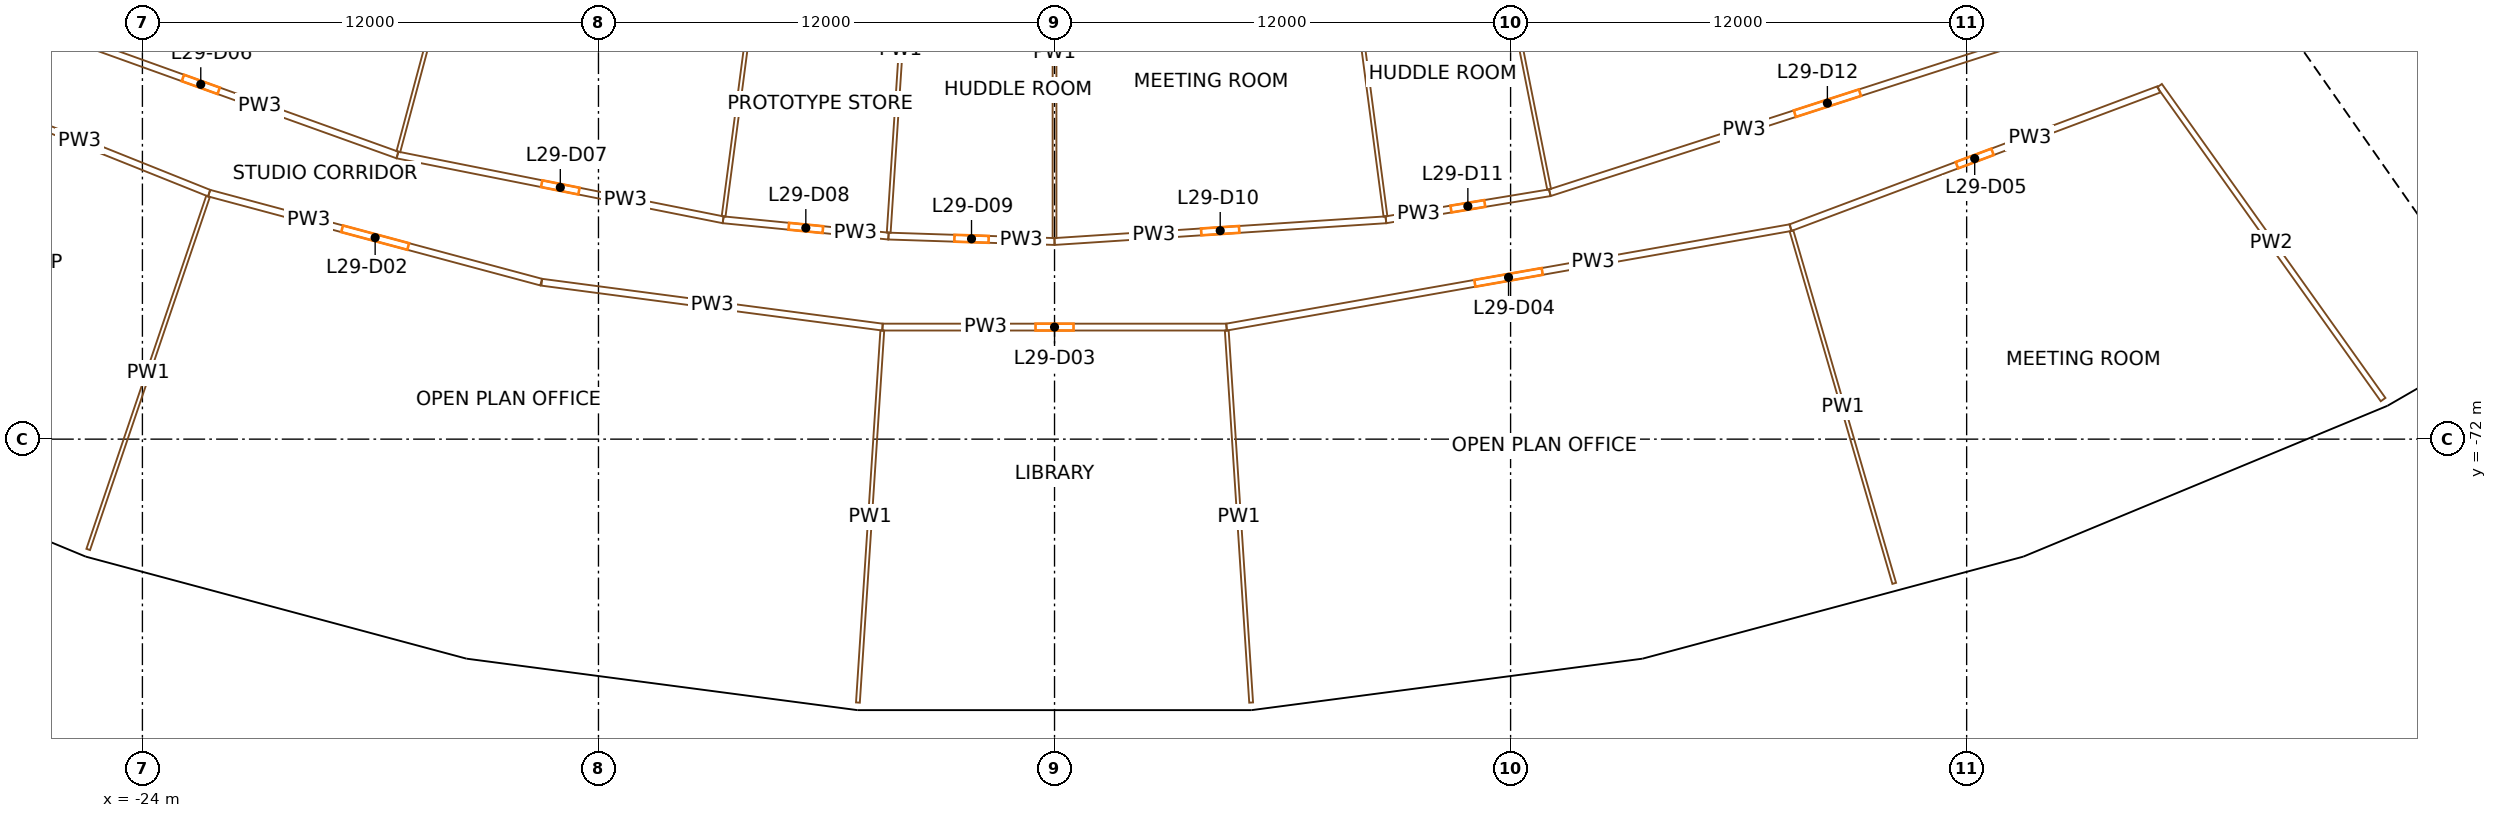
"""IFC4 building model, lengths in metres.
Left out: names, types, materials, properties, quantities, classifications, styles, units other than length and angle.
Written with IfcOpenShell. Run it as: python <this file> out.ifc"""

import sys

from ifc_helpers import new_model, si_unit, direction, frame, frame_2d, origin, origin_2d, place, context, subcontext, project, spatial, rectangle, extrude, element, fill, save


model = new_model("IFC4")
c1 = context("Model", 3, precision=1e-05, world=origin(), true_north=direction((0.0, 1.0)))
c2 = subcontext(c1, "Body", "Model", "MODEL_VIEW")
j1 = project(units=[si_unit("LENGTHUNIT", "METRE"), si_unit("PLANEANGLEUNIT", "RADIAN")], contexts=[c1])
p1 = place(None, origin())
s1 = spatial("IfcSite", under=j1, at=p1, CompositionType="ELEMENT")
p2 = place(p1, origin())
s2 = spatial("IfcBuilding", under=s1, at=p2, CompositionType="ELEMENT")
p3 = place(p2, frame((0.0, 0.0, 129.1)))
s3 = spatial("IfcBuildingStorey", under=s2, at=p3, CompositionType="ELEMENT", Elevation=129.1)
for number, where, z_axis, x_axis in (
    (1, (-24.992, -73.624, 0.0), (0.0, 0.0, 1.0), (0.947, -0.321, 0.0)),
    (2, (-15.168, -76.256, 0.0), (0.0, 0.0, 1.0), (0.981, -0.195, 0.0)),
    (3, (-5.085, -77.583, 0.0), (0.0, 0.0, 1.0), (0.998, -0.065, 0.0)),
    (4, (5.085, -77.583, 0.0), (0.0, 0.0, 1.0), (0.998, 0.065, 0.0)),
    (5, (15.168, -76.256, 0.0), (0.0, 0.0, 1.0), (0.981, 0.195, 0.0)),
    (6, (24.992, -73.624, 0.0), (0.0, 0.0, 1.0), (0.947, 0.321, 0.0)),
    (7, (34.388, -69.732, 0.0), (0.0, 0.0, 1.0), (0.897, 0.442, 0.0)),
):
    element("IfcColumn", number, at=place(p3, frame(where, z_axis=z_axis, x_axis=x_axis)), inside=s3, PredefinedType="COLUMN", context=c2, shape_type="SweptSolid", body=[
        extrude(rectangle(XDim=1.2, YDim=1.5, at=origin_2d()), origin(), (0.0, 0.0, 1.0), 3.8),
    ])
p4 = place(p3, frame((36.717, -66.337, 0.0), z_axis=(0.0, 0.0, 1.0), x_axis=(-0.573577477574, 0.819151315216, 0.0)))
e8 = element("IfcWall", 8, at=p4, inside=s3, PredefinedType="SHEAR", context=c2, shape_type="SweptSolid", body=[
    extrude(rectangle(XDim=14.8, YDim=0.9, at=frame_2d((7.4, 0.0))), origin(), (0.0, 0.0, 1.0), 3.5),
])
p5 = place(p4, frame((6.2, 0.0, 0.0)))
e9 = element("IfcOpeningElement", 9, at=p5, cuts=e8, PredefinedType="OPENING", context=c2, shape_type="SweptSolid", body=[
    extrude(rectangle(XDim=2.4, YDim=2.1, at=frame_2d((1.2, 1.05))), frame((0.0, 0.46, 0.0), z_axis=(0.0, -1.0, 0.0), x_axis=(1.0, 0.0, 0.0)), (0.0, 0.0, 1.0), 0.92),
])
p6 = place(p3, frame((35.221, -63.417, 0.0), z_axis=(0.0, 0.0, 1.0), x_axis=(0.819166993208, 0.573555086491, 0.0)))
e10 = element("IfcWall", 10, at=p6, inside=s3, PredefinedType="SOLIDWALL", context=c2, shape_type="SweptSolid", body=[
    extrude(rectangle(XDim=7.95, YDim=0.3, at=frame_2d((3.975, 0.0))), origin(), (0.0, 0.0, 1.0), 3.5),
])
p7 = place(p3, frame((-29.058, -62.799, 0.0), z_axis=(0.0, 0.0, 1.0), x_axis=(0.92834358791, -0.371723261025, 0.0)))
e11 = element("IfcWall", 11, at=p7, inside=s3, PredefinedType="PARTITIONING", context=c2, shape_type="SweptSolid", body=[
    extrude(rectangle(XDim=7.34, YDim=0.18, at=frame_2d((3.67, 0.0))), origin(), (0.0, 0.0, 1.0), 2.4),
])
p8 = place(p3, frame((-27.64, -60.807, 0.0), z_axis=(0.0, 0.0, 1.0), x_axis=(0.941150861554, -0.337986768669, 0.0)))
e12 = element("IfcWall", 12, at=p8, inside=s3, PredefinedType="PARTITIONING", context=c2, shape_type="SweptSolid", body=[
    extrude(rectangle(XDim=10.998, YDim=0.18, at=frame_2d((5.499, 0.0))), origin(), (0.0, 0.0, 1.0), 2.4),
])
p9 = place(p8, frame((4.999, 0.0, 0.0)))
e13 = element("IfcOpeningElement", 13, at=p9, cuts=e12, PredefinedType="OPENING", context=c2, shape_type="SweptSolid", body=[
    extrude(rectangle(XDim=1.0, YDim=2.1, at=frame_2d((0.5, 1.05))), frame((0.0, 0.1, 0.0), z_axis=(0.0, -1.0, 0.0), x_axis=(1.0, 0.0, 0.0)), (0.0, 0.0, 1.0), 0.2),
])
p10 = place(p3, frame((-25.426, -74.902, 0.0), z_axis=(0.0, 0.0, 1.0), x_axis=(0.321441806318, 0.946929334824, 0.0)))
e14 = element("IfcWall", 14, at=p10, inside=s3, PredefinedType="PARTITIONING", context=c2, shape_type="SweptSolid", body=[
    extrude(rectangle(XDim=9.81, YDim=0.1, at=frame_2d((4.905, 0.0))), origin(), (0.0, 0.0, 1.0), 2.4),
])
p11 = place(p3, frame((-13.509, -67.868, 0.0), z_axis=(0.0, 0.0, 1.0), x_axis=(-0.965930457668, 0.258801759942, 0.0)))
e15 = element("IfcWall", 15, at=p11, inside=s3, PredefinedType="PARTITIONING", context=c2, shape_type="SweptSolid", body=[
    extrude(rectangle(XDim=9.043, YDim=0.18, at=frame_2d((4.521, 0.0))), origin(), (0.0, 0.0, 1.0), 2.4),
])
p12 = place(p11, frame((3.621, 0.0, 0.0)))
e16 = element("IfcOpeningElement", 16, at=p12, cuts=e15, PredefinedType="OPENING", context=c2, shape_type="SweptSolid", body=[
    extrude(rectangle(XDim=1.8, YDim=2.1, at=frame_2d((0.9, 1.05))), frame((0.0, 0.1, 0.0), z_axis=(0.0, -1.0, 0.0), x_axis=(1.0, 0.0, 0.0)), (0.0, 0.0, 1.0), 0.2),
])
p13 = place(p3, frame((-17.289, -64.524, 0.0), z_axis=(0.0, 0.0, 1.0), x_axis=(0.980786466832, -0.195084357342, 0.0)))
e17 = element("IfcWall", 17, at=p13, inside=s3, PredefinedType="PARTITIONING", context=c2, shape_type="SweptSolid", body=[
    extrude(rectangle(XDim=8.738, YDim=0.18, at=frame_2d((4.369, 0.0))), origin(), (0.0, 0.0, 1.0), 2.4),
])
p14 = place(p13, frame((3.869, 0.0, 0.0)))
e18 = element("IfcOpeningElement", 18, at=p14, cuts=e17, PredefinedType="OPENING", context=c2, shape_type="SweptSolid", body=[
    extrude(rectangle(XDim=1.0, YDim=2.1, at=frame_2d((0.5, 1.05))), frame((0.0, 0.1, 0.0), z_axis=(0.0, -1.0, 0.0), x_axis=(1.0, 0.0, 0.0)), (0.0, 0.0, 1.0), 0.2),
])
p15 = place(p3, frame((-14.747, -55.037, 0.0), z_axis=(0.0, 0.0, 1.0), x_axis=(-0.258828880572, -0.965923190829, 0.0)))
e19 = element("IfcWall", 19, at=p15, inside=s3, PredefinedType="PARTITIONING", context=c2, shape_type="SweptSolid", body=[
    extrude(rectangle(XDim=9.731, YDim=0.1, at=frame_2d((4.866, 0.0))), origin(), (0.0, 0.0, 1.0), 2.4),
])
p16 = place(p3, frame((-13.491, -67.872, 0.0), z_axis=(0.0, 0.0, 1.0), x_axis=(0.991447218368, -0.130508287819, 0.0)))
e20 = element("IfcWall", 20, at=p16, inside=s3, PredefinedType="PARTITIONING", context=c2, shape_type="SweptSolid", body=[
    extrude(rectangle(XDim=9.043, YDim=0.18, at=frame_2d((4.521, 0.0))), origin(), (0.0, 0.0, 1.0), 2.4),
])
p17 = place(p3, frame((-8.719, -66.229, 0.0), z_axis=(0.0, 0.0, 1.0), x_axis=(0.995184826457, -0.098016127192, 0.0)))
e21 = element("IfcWall", 21, at=p17, inside=s3, PredefinedType="PARTITIONING", context=c2, shape_type="SweptSolid", body=[
    extrude(rectangle(XDim=4.371, YDim=0.18, at=frame_2d((2.186, 0.0))), origin(), (0.0, 0.0, 1.0), 2.4),
])
p18 = place(p17, frame((1.736, 0.0, 0.0)))
e22 = element("IfcOpeningElement", 22, at=p18, cuts=e21, PredefinedType="OPENING", context=c2, shape_type="SweptSolid", body=[
    extrude(rectangle(XDim=0.9, YDim=2.1, at=frame_2d((0.45, 1.05))), frame((0.0, 0.1, 0.0), z_axis=(0.0, -1.0, 0.0), x_axis=(1.0, 0.0, 0.0)), (0.0, 0.0, 1.0), 0.2),
])
p19 = place(p3, frame((-7.437, -56.491, 0.0), z_axis=(0.0, 0.0, 1.0), x_axis=(-0.130531739513, -0.991444131043, 0.0)))
e23 = element("IfcWall", 23, at=p19, inside=s3, PredefinedType="PARTITIONING", context=c2, shape_type="SweptSolid", body=[
    extrude(rectangle(XDim=9.731, YDim=0.1, at=frame_2d((4.866, 0.0))), origin(), (0.0, 0.0, 1.0), 2.4),
])
p20 = place(p3, frame((-5.173, -78.931, 0.0), z_axis=(0.0, 0.0, 1.0), x_axis=(0.065402368846, 0.997858973077, 0.0)))
e24 = element("IfcWall", 24, at=p20, inside=s3, PredefinedType="PARTITIONING", context=c2, shape_type="SweptSolid", body=[
    extrude(rectangle(XDim=9.81, YDim=0.1, at=frame_2d((4.905, 0.0))), origin(), (0.0, 0.0, 1.0), 2.4),
])
p21 = place(p3, frame((4.526, -69.052, 0.0), z_axis=(0.0, 0.0, 1.0), x_axis=(-1.0, 0.0, 0.0)))
e25 = element("IfcWall", 25, at=p21, inside=s3, PredefinedType="PARTITIONING", context=c2, shape_type="SweptSolid", body=[
    extrude(rectangle(XDim=9.052, YDim=0.18, at=frame_2d((4.526, 0.0))), origin(), (0.0, 0.0, 1.0), 2.4),
])
p22 = place(p21, frame((4.026, 0.0, 0.0)))
e26 = element("IfcOpeningElement", 26, at=p22, cuts=e25, PredefinedType="OPENING", context=c2, shape_type="SweptSolid", body=[
    extrude(rectangle(XDim=1.0, YDim=2.1, at=frame_2d((0.5, 1.05))), frame((0.0, 0.1, 0.0), z_axis=(0.0, -1.0, 0.0), x_axis=(1.0, 0.0, 0.0)), (0.0, 0.0, 1.0), 0.2),
])
p23 = place(p3, frame((-4.369, -66.657, 0.0), z_axis=(0.0, 0.0, 1.0), x_axis=(0.99946426167, -0.03272903366, 0.0)))
e27 = element("IfcWall", 27, at=p23, inside=s3, PredefinedType="PARTITIONING", context=c2, shape_type="SweptSolid", body=[
    extrude(rectangle(XDim=4.371, YDim=0.18, at=frame_2d((2.186, 0.0))), origin(), (0.0, 0.0, 1.0), 2.4),
])
p24 = place(p23, frame((1.736, 0.0, 0.0)))
e28 = element("IfcOpeningElement", 28, at=p24, cuts=e27, PredefinedType="OPENING", context=c2, shape_type="SweptSolid", body=[
    extrude(rectangle(XDim=0.9, YDim=2.1, at=frame_2d((0.45, 1.05))), frame((0.0, 0.1, 0.0), z_axis=(0.0, -1.0, 0.0), x_axis=(1.0, 0.0, 0.0)), (0.0, 0.0, 1.0), 0.2),
])
p25 = place(p3, frame((-3.735, -56.978, 0.0), z_axis=(0.0, 0.0, 1.0), x_axis=(-0.065392602582, -0.997859613136, 0.0)))
e29 = element("IfcWall", 29, at=p25, inside=s3, PredefinedType="PARTITIONING", context=c2, shape_type="SweptSolid", body=[
    extrude(rectangle(XDim=9.61, YDim=0.1, at=frame_2d((4.805, 0.0))), origin(), (0.0, 0.0, 1.0), 2.4),
])
p26 = place(p3, frame((0.0, -66.8, 0.0), z_axis=(0.0, 0.0, 1.0), x_axis=(0.997858593599, 0.065408158359, 0.0)))
e30 = element("IfcWall", 30, at=p26, inside=s3, PredefinedType="PARTITIONING", context=c2, shape_type="SweptSolid", body=[
    extrude(rectangle(XDim=8.738, YDim=0.18, at=frame_2d((4.369, 0.0))), origin(), (0.0, 0.0, 1.0), 2.4),
])
p27 = place(p26, frame((3.869, 0.0, 0.0)))
e31 = element("IfcOpeningElement", 31, at=p27, cuts=e30, PredefinedType="OPENING", context=c2, shape_type="SweptSolid", body=[
    extrude(rectangle(XDim=1.0, YDim=2.1, at=frame_2d((0.5, 1.05))), frame((0.0, 0.1, 0.0), z_axis=(0.0, -1.0, 0.0), x_axis=(1.0, 0.0, 0.0)), (0.0, 0.0, 1.0), 0.2),
])
p28 = place(p3, frame((0.0, -56.979, 0.0), z_axis=(0.0, 0.0, 1.0), x_axis=(0.0, -1.0, 0.0)))
e32 = element("IfcWall", 32, at=p28, inside=s3, PredefinedType="PARTITIONING", context=c2, shape_type="SweptSolid", body=[
    extrude(rectangle(XDim=9.731, YDim=0.1, at=frame_2d((4.866, 0.0))), origin(), (0.0, 0.0, 1.0), 2.4),
])
p29 = place(p3, frame((19.366, -66.435, 0.0), z_axis=(0.0, 0.0, 1.0), x_axis=(-0.984805080703, -0.173663332402, 0.0)))
e33 = element("IfcWall", 33, at=p29, inside=s3, PredefinedType="PARTITIONING", context=c2, shape_type="SweptSolid", body=[
    extrude(rectangle(XDim=15.069, YDim=0.18, at=frame_2d((7.535, 0.0))), origin(), (0.0, 0.0, 1.0), 2.4),
])
p30 = place(p29, frame((6.635, 0.0, 0.0)))
e34 = element("IfcOpeningElement", 34, at=p30, cuts=e33, PredefinedType="OPENING", context=c2, shape_type="SweptSolid", body=[
    extrude(rectangle(XDim=1.8, YDim=2.1, at=frame_2d((0.9, 1.05))), frame((0.0, 0.1, 0.0), z_axis=(0.0, -1.0, 0.0), x_axis=(1.0, 0.0, 0.0)), (0.0, 0.0, 1.0), 0.2),
])
p31 = place(p3, frame((5.173, -78.931, 0.0), z_axis=(0.0, 0.0, 1.0), x_axis=(-0.065402368846, 0.997858973077, 0.0)))
e35 = element("IfcWall", 35, at=p31, inside=s3, PredefinedType="PARTITIONING", context=c2, shape_type="SweptSolid", body=[
    extrude(rectangle(XDim=9.81, YDim=0.1, at=frame_2d((4.905, 0.0))), origin(), (0.0, 0.0, 1.0), 2.4),
])
p32 = place(p3, frame((7.437, -56.491, 0.0), z_axis=(0.0, 0.0, 1.0), x_axis=(0.130531739513, -0.991444131043, 0.0)))
e36 = element("IfcWall", 36, at=p32, inside=s3, PredefinedType="PARTITIONING", context=c2, shape_type="SweptSolid", body=[
    extrude(rectangle(XDim=9.731, YDim=0.1, at=frame_2d((4.866, 0.0))), origin(), (0.0, 0.0, 1.0), 2.4),
])
p33 = place(p3, frame((8.719, -66.229, 0.0), z_axis=(0.0, 0.0, 1.0), x_axis=(0.986638873051, 0.162922479065, 0.0)))
e37 = element("IfcWall", 37, at=p33, inside=s3, PredefinedType="PARTITIONING", context=c2, shape_type="SweptSolid", body=[
    extrude(rectangle(XDim=4.371, YDim=0.18, at=frame_2d((2.186, 0.0))), origin(), (0.0, 0.0, 1.0), 2.4),
])
p34 = place(p33, frame((1.736, 0.0, 0.0)))
e38 = element("IfcOpeningElement", 38, at=p34, cuts=e37, PredefinedType="OPENING", context=c2, shape_type="SweptSolid", body=[
    extrude(rectangle(XDim=0.9, YDim=2.1, at=frame_2d((0.45, 1.05))), frame((0.0, 0.1, 0.0), z_axis=(0.0, -1.0, 0.0), x_axis=(1.0, 0.0, 0.0)), (0.0, 0.0, 1.0), 0.2),
])
p35 = place(p3, frame((11.14, -56.003, 0.0), z_axis=(0.0, 0.0, 1.0), x_axis=(0.195085169116, -0.980786305365, 0.0)))
e39 = element("IfcWall", 39, at=p35, inside=s3, PredefinedType="PARTITIONING", context=c2, shape_type="SweptSolid", body=[
    extrude(rectangle(XDim=9.61, YDim=0.1, at=frame_2d((4.805, 0.0))), origin(), (0.0, 0.0, 1.0), 2.4),
])
p36 = place(p3, frame((13.032, -65.516, 0.0), z_axis=(0.0, 0.0, 1.0), x_axis=(0.951705469381, 0.307012539729, 0.0)))
e40 = element("IfcWall", 40, at=p36, inside=s3, PredefinedType="PARTITIONING", context=c2, shape_type="SweptSolid", body=[
    extrude(rectangle(XDim=15.348, YDim=0.18, at=frame_2d((7.674, 0.0))), origin(), (0.0, 0.0, 1.0), 2.4),
])
p37 = place(p36, frame((6.774, 0.0, 0.0)))
e41 = element("IfcOpeningElement", 41, at=p37, cuts=e40, PredefinedType="OPENING", context=c2, shape_type="SweptSolid", body=[
    extrude(rectangle(XDim=1.8, YDim=2.1, at=frame_2d((0.9, 1.05))), frame((0.0, 0.1, 0.0), z_axis=(0.0, -1.0, 0.0), x_axis=(1.0, 0.0, 0.0)), (0.0, 0.0, 1.0), 0.2),
])
p38 = place(p3, frame((29.057, -62.798, 0.0), z_axis=(0.0, 0.0, 1.0), x_axis=(-0.936236096431, -0.351371557956, 0.0)))
e42 = element("IfcWall", 42, at=p38, inside=s3, PredefinedType="PARTITIONING", context=c2, shape_type="SweptSolid", body=[
    extrude(rectangle(XDim=10.352, YDim=0.18, at=frame_2d((5.176, 0.0))), origin(), (0.0, 0.0, 1.0), 2.4),
])
p39 = place(p38, frame((4.676, 0.0, 0.0)))
e43 = element("IfcOpeningElement", 43, at=p39, cuts=e42, PredefinedType="OPENING", context=c2, shape_type="SweptSolid", body=[
    extrude(rectangle(XDim=1.0, YDim=2.1, at=frame_2d((0.5, 1.05))), frame((0.0, 0.1, 0.0), z_axis=(0.0, -1.0, 0.0), x_axis=(1.0, 0.0, 0.0)), (0.0, 0.0, 1.0), 0.2),
])
p40 = place(p3, frame((22.094, -75.794, 0.0), z_axis=(0.0, 0.0, 1.0), x_axis=(-0.279851497416, 0.960043300791, 0.0)))
e44 = element("IfcWall", 44, at=p40, inside=s3, PredefinedType="PARTITIONING", context=c2, shape_type="SweptSolid", body=[
    extrude(rectangle(XDim=9.659, YDim=0.1, at=frame_2d((4.83, 0.0))), origin(), (0.0, 0.0, 1.0), 2.4),
])
p41 = place(p3, frame((29.075, -62.698, 0.0), z_axis=(0.0, 0.0, 1.0), x_axis=(0.58002146853, -0.814601188339, 0.0)))
e45 = element("IfcWall", 45, at=p41, inside=s3, PredefinedType="PARTITIONING", context=c2, shape_type="SweptSolid", body=[
    extrude(rectangle(XDim=10.141, YDim=0.15, at=frame_2d((5.071, 0.0))), origin(), (0.0, 0.0, 1.0), 2.4),
])
p42 = place(p12, origin())
e46 = element("IfcDoor", 46, at=p42, inside=s3, OperationType="DOUBLE_DOOR_SINGLE_SWING", PredefinedType="DOOR", context=c2, shape_type="SweptSolid", body=[
    extrude(rectangle(XDim=1.8, YDim=2.1, at=frame_2d((0.9, 1.05))), frame((0.0, 0.025, 0.0), z_axis=(0.0, -1.0, 0.0), x_axis=(1.0, 0.0, 0.0)), (0.0, 0.0, 1.0), 0.05),
])
fill(e16, e46)
p43 = place(p22, origin())
e47 = element("IfcDoor", 47, at=p43, inside=s3, OperationType="SINGLE_SWING_RIGHT", PredefinedType="DOOR", context=c2, shape_type="SweptSolid", body=[
    extrude(rectangle(XDim=1.0, YDim=2.1, at=frame_2d((0.5, 1.05))), frame((0.0, 0.025, 0.0), z_axis=(0.0, -1.0, 0.0), x_axis=(1.0, 0.0, 0.0)), (0.0, 0.0, 1.0), 0.05),
])
fill(e26, e47)
p44 = place(p30, origin())
e48 = element("IfcDoor", 48, at=p44, inside=s3, OperationType="DOUBLE_DOOR_SINGLE_SWING", PredefinedType="DOOR", context=c2, shape_type="SweptSolid", body=[
    extrude(rectangle(XDim=1.8, YDim=2.1, at=frame_2d((0.9, 1.05))), frame((0.0, 0.025, 0.0), z_axis=(0.0, -1.0, 0.0), x_axis=(1.0, 0.0, 0.0)), (0.0, 0.0, 1.0), 0.05),
])
fill(e34, e48)
p45 = place(p39, origin())
e49 = element("IfcDoor", 49, at=p45, inside=s3, OperationType="SINGLE_SWING_RIGHT", PredefinedType="DOOR", context=c2, shape_type="SweptSolid", body=[
    extrude(rectangle(XDim=1.0, YDim=2.1, at=frame_2d((0.5, 1.05))), frame((0.0, 0.025, 0.0), z_axis=(0.0, -1.0, 0.0), x_axis=(1.0, 0.0, 0.0)), (0.0, 0.0, 1.0), 0.05),
])
fill(e43, e49)
p46 = place(p9, origin())
e50 = element("IfcDoor", 50, at=p46, inside=s3, OperationType="SINGLE_SWING_RIGHT", PredefinedType="DOOR", context=c2, shape_type="SweptSolid", body=[
    extrude(rectangle(XDim=1.0, YDim=2.1, at=frame_2d((0.5, 1.05))), frame((0.0, 0.025, 0.0), z_axis=(0.0, -1.0, 0.0), x_axis=(1.0, 0.0, 0.0)), (0.0, 0.0, 1.0), 0.05),
])
fill(e13, e50)
p47 = place(p14, origin())
e51 = element("IfcDoor", 51, at=p47, inside=s3, OperationType="SINGLE_SWING_RIGHT", PredefinedType="DOOR", context=c2, shape_type="SweptSolid", body=[
    extrude(rectangle(XDim=1.0, YDim=2.1, at=frame_2d((0.5, 1.05))), frame((0.0, 0.025, 0.0), z_axis=(0.0, -1.0, 0.0), x_axis=(1.0, 0.0, 0.0)), (0.0, 0.0, 1.0), 0.05),
])
fill(e18, e51)
p48 = place(p18, origin())
e52 = element("IfcDoor", 52, at=p48, inside=s3, OperationType="SINGLE_SWING_RIGHT", PredefinedType="DOOR", context=c2, shape_type="SweptSolid", body=[
    extrude(rectangle(XDim=0.9, YDim=2.1, at=frame_2d((0.45, 1.05))), frame((0.0, 0.025, 0.0), z_axis=(0.0, -1.0, 0.0), x_axis=(1.0, 0.0, 0.0)), (0.0, 0.0, 1.0), 0.05),
])
fill(e22, e52)
p49 = place(p24, origin())
e53 = element("IfcDoor", 53, at=p49, inside=s3, OperationType="SINGLE_SWING_RIGHT", PredefinedType="DOOR", context=c2, shape_type="SweptSolid", body=[
    extrude(rectangle(XDim=0.9, YDim=2.1, at=frame_2d((0.45, 1.05))), frame((0.0, 0.025, 0.0), z_axis=(0.0, -1.0, 0.0), x_axis=(1.0, 0.0, 0.0)), (0.0, 0.0, 1.0), 0.05),
])
fill(e28, e53)
p50 = place(p27, origin())
e54 = element("IfcDoor", 54, at=p50, inside=s3, OperationType="SINGLE_SWING_RIGHT", PredefinedType="DOOR", context=c2, shape_type="SweptSolid", body=[
    extrude(rectangle(XDim=1.0, YDim=2.1, at=frame_2d((0.5, 1.05))), frame((0.0, 0.025, 0.0), z_axis=(0.0, -1.0, 0.0), x_axis=(1.0, 0.0, 0.0)), (0.0, 0.0, 1.0), 0.05),
])
fill(e31, e54)
p51 = place(p34, origin())
e55 = element("IfcDoor", 55, at=p51, inside=s3, OperationType="SINGLE_SWING_RIGHT", PredefinedType="DOOR", context=c2, shape_type="SweptSolid", body=[
    extrude(rectangle(XDim=0.9, YDim=2.1, at=frame_2d((0.45, 1.05))), frame((0.0, 0.025, 0.0), z_axis=(0.0, -1.0, 0.0), x_axis=(1.0, 0.0, 0.0)), (0.0, 0.0, 1.0), 0.05),
])
fill(e38, e55)
p52 = place(p37, origin())
e56 = element("IfcDoor", 56, at=p52, inside=s3, OperationType="DOUBLE_DOOR_SINGLE_SWING", PredefinedType="DOOR", context=c2, shape_type="SweptSolid", body=[
    extrude(rectangle(XDim=1.8, YDim=2.1, at=frame_2d((0.9, 1.05))), frame((0.0, 0.025, 0.0), z_axis=(0.0, -1.0, 0.0), x_axis=(1.0, 0.0, 0.0)), (0.0, 0.0, 1.0), 0.05),
])
fill(e41, e56)
save(model, sys.argv[1])
